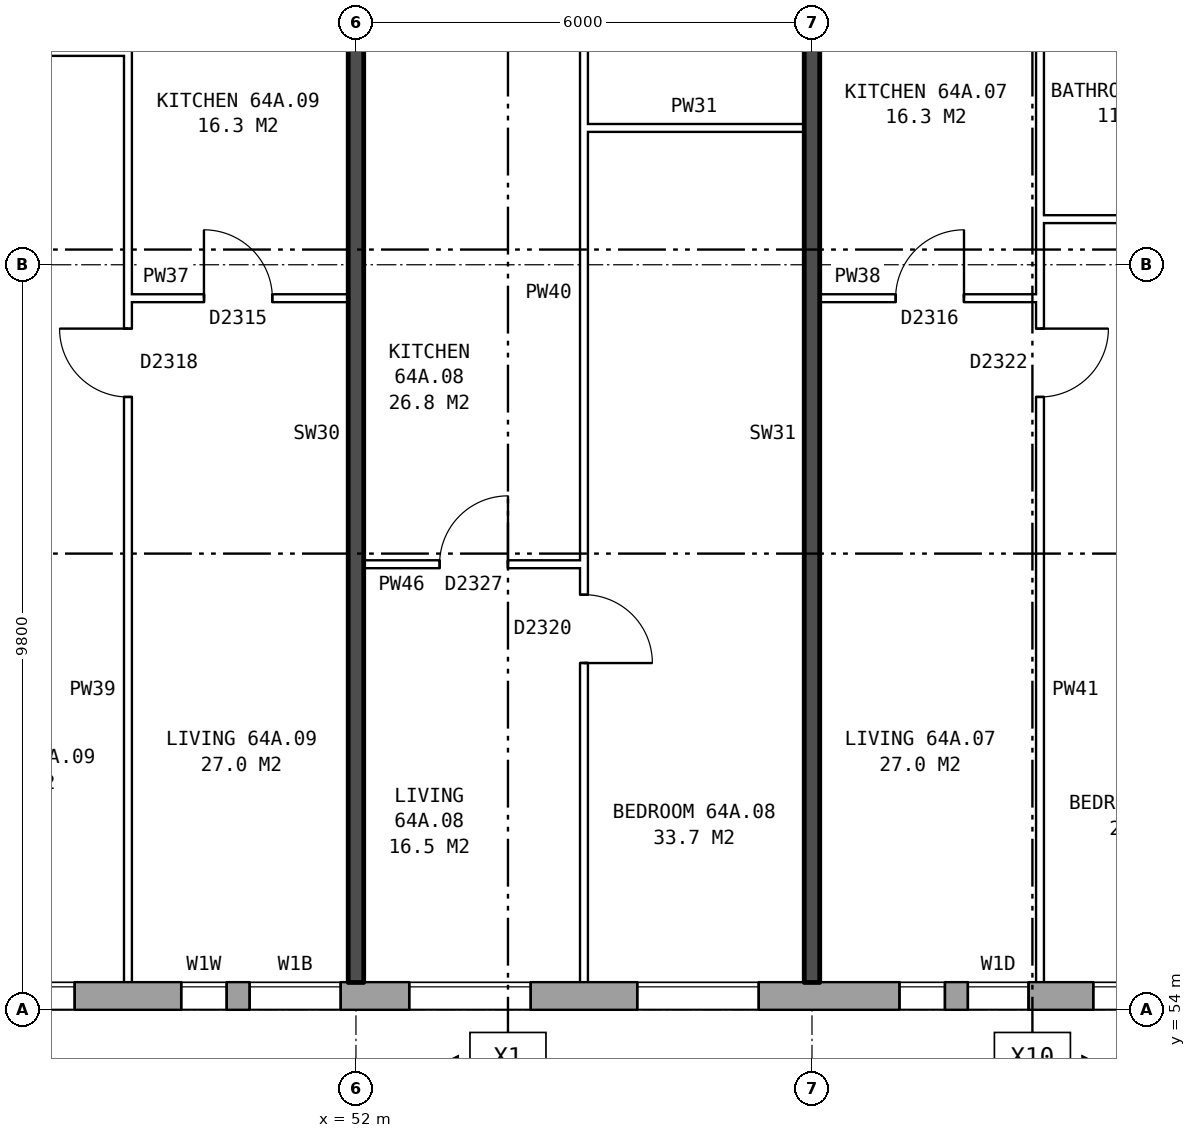
"""IFC4 building model, lengths in metres.
Left out: names, types, materials, properties, quantities, classifications, styles, units other than length and angle.
Written with IfcOpenShell. Run it as: python <this file> out.ifc"""

import sys

from ifc_helpers import new_model, si_unit, direction, frame, frame_2d, origin, place, context, subcontext, project, spatial, rectangle, extrude, element, fill, save


model = new_model("IFC4")
c1 = context("Model", 3, precision=1e-05, world=origin(), true_north=direction((0.0, 1.0)))
c2 = subcontext(c1, "Body", "Model", "MODEL_VIEW")
j1 = project(units=[si_unit("LENGTHUNIT", "METRE"), si_unit("PLANEANGLEUNIT", "RADIAN")], contexts=[c1])
p1 = place(None, origin())
s1 = spatial("IfcSite", under=j1, at=p1, CompositionType="ELEMENT")
p2 = place(p1, origin())
s2 = spatial("IfcBuilding", under=s1, at=p2, CompositionType="ELEMENT")
p3 = place(p2, frame((0.0, 0.0, 227.6)))
s3 = spatial("IfcBuildingStorey", under=s2, at=p3, CompositionType="ELEMENT", Elevation=227.6)
p4 = place(p3, frame((35.075, 54.18, 0.0), z_axis=(0.0, 0.0, 1.0), x_axis=(1.0, 0.0, 0.0)))
e1 = element("IfcWall", 1, at=p4, inside=s3, PredefinedType="STANDARD", context=c2, shape_type="SweptSolid", body=[
    extrude(rectangle(XDim=39.875, YDim=0.36, at=frame_2d((19.938, 0.0))), origin(), (0.0, 0.0, 1.0), 2.85),
])
p5 = place(p4, frame((2.625, 0.0, 0.8)))
e2 = element("IfcOpeningElement", 2, at=p5, cuts=e1, PredefinedType="OPENING", context=c2, shape_type="SweptSolid", body=[
    extrude(rectangle(XDim=1.6, YDim=1.8, at=frame_2d((0.8, 0.9))), frame((0.0, 0.19, 0.0), z_axis=(0.0, -1.0, 0.0), x_axis=(1.0, 0.0, 0.0)), (0.0, 0.0, 1.0), 0.38),
])
p6 = place(p4, frame((5.625, 0.0, 0.8)))
e3 = element("IfcOpeningElement", 3, at=p6, cuts=e1, PredefinedType="OPENING", context=c2, shape_type="SweptSolid", body=[
    extrude(rectangle(XDim=1.6, YDim=1.8, at=frame_2d((0.8, 0.9))), frame((0.0, 0.19, 0.0), z_axis=(0.0, -1.0, 0.0), x_axis=(1.0, 0.0, 0.0)), (0.0, 0.0, 1.0), 0.38),
])
p7 = place(p4, frame((8.625, 0.0, 0.8)))
e4 = element("IfcOpeningElement", 4, at=p7, cuts=e1, PredefinedType="OPENING", context=c2, shape_type="SweptSolid", body=[
    extrude(rectangle(XDim=1.6, YDim=1.8, at=frame_2d((0.8, 0.9))), frame((0.0, 0.19, 0.0), z_axis=(0.0, -1.0, 0.0), x_axis=(1.0, 0.0, 0.0)), (0.0, 0.0, 1.0), 0.38),
])
p8 = place(p4, frame((11.625, 0.0, 0.8)))
e5 = element("IfcOpeningElement", 5, at=p8, cuts=e1, PredefinedType="OPENING", context=c2, shape_type="SweptSolid", body=[
    extrude(rectangle(XDim=1.6, YDim=1.8, at=frame_2d((0.8, 0.9))), frame((0.0, 0.19, 0.0), z_axis=(0.0, -1.0, 0.0), x_axis=(1.0, 0.0, 0.0)), (0.0, 0.0, 1.0), 0.38),
])
p9 = place(p4, frame((14.625, 0.0, 0.35)))
e6 = element("IfcOpeningElement", 6, at=p9, cuts=e1, PredefinedType="OPENING", context=c2, shape_type="SweptSolid", body=[
    extrude(rectangle(XDim=0.6, YDim=0.9, at=frame_2d((0.3, 0.45))), frame((0.0, 0.19, 0.0), z_axis=(0.0, -1.0, 0.0), x_axis=(1.0, 0.0, 0.0)), (0.0, 0.0, 1.0), 0.38),
])
p10 = place(p4, frame((17.625, 0.0, 0.8)))
e7 = element("IfcOpeningElement", 7, at=p10, cuts=e1, PredefinedType="OPENING", context=c2, shape_type="SweptSolid", body=[
    extrude(rectangle(XDim=1.6, YDim=1.8, at=frame_2d((0.8, 0.9))), frame((0.0, 0.19, 0.0), z_axis=(0.0, -1.0, 0.0), x_axis=(1.0, 0.0, 0.0)), (0.0, 0.0, 1.0), 0.38),
])
p11 = place(p4, frame((20.625, 0.0, 0.8)))
e8 = element("IfcOpeningElement", 8, at=p11, cuts=e1, PredefinedType="OPENING", context=c2, shape_type="SweptSolid", body=[
    extrude(rectangle(XDim=1.6, YDim=1.8, at=frame_2d((0.8, 0.9))), frame((0.0, 0.19, 0.0), z_axis=(0.0, -1.0, 0.0), x_axis=(1.0, 0.0, 0.0)), (0.0, 0.0, 1.0), 0.38),
])
p12 = place(p4, frame((24.075, 0.0, 1.7)))
e9 = element("IfcOpeningElement", 9, at=p12, cuts=e1, PredefinedType="OPENING", context=c2, shape_type="SweptSolid", body=[
    extrude(rectangle(XDim=0.6, YDim=0.9, at=frame_2d((0.3, 0.45))), frame((0.0, 0.19, 0.0), z_axis=(0.0, -1.0, 0.0), x_axis=(1.0, 0.0, 0.0)), (0.0, 0.0, 1.0), 0.38),
])
p13 = place(p4, frame((26.625, 0.0, 0.8)))
e10 = element("IfcOpeningElement", 10, at=p13, cuts=e1, PredefinedType="OPENING", context=c2, shape_type="SweptSolid", body=[
    extrude(rectangle(XDim=1.6, YDim=1.8, at=frame_2d((0.8, 0.9))), frame((0.0, 0.19, 0.0), z_axis=(0.0, -1.0, 0.0), x_axis=(1.0, 0.0, 0.0)), (0.0, 0.0, 1.0), 0.38),
])
p14 = place(p4, frame((29.625, 0.0, 0.8)))
e11 = element("IfcOpeningElement", 11, at=p14, cuts=e1, PredefinedType="OPENING", context=c2, shape_type="SweptSolid", body=[
    extrude(rectangle(XDim=1.6, YDim=1.8, at=frame_2d((0.8, 0.9))), frame((0.0, 0.19, 0.0), z_axis=(0.0, -1.0, 0.0), x_axis=(1.0, 0.0, 0.0)), (0.0, 0.0, 1.0), 0.38),
])
p15 = place(p4, frame((32.625, 0.0, 0.8)))
e12 = element("IfcOpeningElement", 12, at=p15, cuts=e1, PredefinedType="OPENING", context=c2, shape_type="SweptSolid", body=[
    extrude(rectangle(XDim=1.6, YDim=1.8, at=frame_2d((0.8, 0.9))), frame((0.0, 0.19, 0.0), z_axis=(0.0, -1.0, 0.0), x_axis=(1.0, 0.0, 0.0)), (0.0, 0.0, 1.0), 0.38),
])
p16 = place(p4, frame((35.625, 0.0, 0.8)))
e13 = element("IfcOpeningElement", 13, at=p16, cuts=e1, PredefinedType="OPENING", context=c2, shape_type="SweptSolid", body=[
    extrude(rectangle(XDim=1.6, YDim=1.8, at=frame_2d((0.8, 0.9))), frame((0.0, 0.19, 0.0), z_axis=(0.0, -1.0, 0.0), x_axis=(1.0, 0.0, 0.0)), (0.0, 0.0, 1.0), 0.38),
])
p17 = place(p4, frame((15.525, 0.0, 0.75)))
e14 = element("IfcOpeningElement", 14, at=p17, cuts=e1, PredefinedType="OPENING", context=c2, shape_type="SweptSolid", body=[
    extrude(rectangle(XDim=1.2, YDim=1.8, at=frame_2d((0.6, 0.9))), frame((0.0, 0.19, 0.0), z_axis=(0.0, -1.0, 0.0), x_axis=(1.0, 0.0, 0.0)), (0.0, 0.0, 1.0), 0.38),
])
p18 = place(p4, frame((24.975, 0.0, 0.8)))
e15 = element("IfcOpeningElement", 15, at=p18, cuts=e1, PredefinedType="OPENING", context=c2, shape_type="SweptSolid", body=[
    extrude(rectangle(XDim=0.8, YDim=1.8, at=frame_2d((0.4, 0.9))), frame((0.0, 0.19, 0.0), z_axis=(0.0, -1.0, 0.0), x_axis=(1.0, 0.0, 0.0)), (0.0, 0.0, 1.0), 0.38),
])
p19 = place(p3, frame((52.1, 59.86, 0.0), z_axis=(0.0, 0.0, 1.0), x_axis=(1.0, 0.0, 0.0)))
e16 = element("IfcWall", 16, at=p19, inside=s3, PredefinedType="PARTITIONING", context=c2, shape_type="SweptSolid", body=[
    extrude(rectangle(XDim=2.9, YDim=0.1, at=frame_2d((1.45, 0.0))), origin(), (0.0, 0.0, 1.0), 2.85),
])
p20 = place(p19, frame((1.0, 0.0, 0.0)))
e17 = element("IfcOpeningElement", 17, at=p20, cuts=e16, PredefinedType="OPENING", context=c2, shape_type="SweptSolid", body=[
    extrude(rectangle(XDim=0.9, YDim=2.1, at=frame_2d((0.45, 1.05))), frame((0.0, 0.06, 0.0), z_axis=(0.0, -1.0, 0.0), x_axis=(1.0, 0.0, 0.0)), (0.0, 0.0, 1.0), 0.12),
])
p21 = place(p3, frame((49.0, 63.36, 0.0), z_axis=(0.0, 0.0, 1.0), x_axis=(1.0, 0.0, 0.0)))
e18 = element("IfcWall", 18, at=p21, inside=s3, PredefinedType="PARTITIONING", context=c2, shape_type="SweptSolid", body=[
    extrude(rectangle(XDim=2.9, YDim=0.1, at=frame_2d((1.45, 0.0))), origin(), (0.0, 0.0, 1.0), 2.85),
])
p22 = place(p21, frame((1.0, 0.0, 0.0)))
e19 = element("IfcOpeningElement", 19, at=p22, cuts=e18, PredefinedType="OPENING", context=c2, shape_type="SweptSolid", body=[
    extrude(rectangle(XDim=0.9, YDim=2.1, at=frame_2d((0.45, 1.05))), frame((0.0, 0.06, 0.0), z_axis=(0.0, -1.0, 0.0), x_axis=(1.0, 0.0, 0.0)), (0.0, 0.0, 1.0), 0.12),
])
p23 = place(p3, frame((58.1, 63.36, 0.0), z_axis=(0.0, 0.0, 1.0), x_axis=(1.0, 0.0, 0.0)))
e20 = element("IfcWall", 20, at=p23, inside=s3, PredefinedType="PARTITIONING", context=c2, shape_type="SweptSolid", body=[
    extrude(rectangle(XDim=2.9, YDim=0.1, at=frame_2d((1.45, 0.0))), origin(), (0.0, 0.0, 1.0), 2.85),
])
p24 = place(p23, frame((1.0, 0.0, 0.0)))
e21 = element("IfcOpeningElement", 21, at=p24, cuts=e20, PredefinedType="OPENING", context=c2, shape_type="SweptSolid", body=[
    extrude(rectangle(XDim=0.9, YDim=2.1, at=frame_2d((0.45, 1.05))), frame((0.0, 0.06, 0.0), z_axis=(0.0, -1.0, 0.0), x_axis=(1.0, 0.0, 0.0)), (0.0, 0.0, 1.0), 0.12),
])
p25 = place(p3, frame((61.0, 64.4, 0.0), z_axis=(0.0, 0.0, 1.0), x_axis=(1.0, 0.0, 0.0)))
e22 = element("IfcWall", 22, at=p25, inside=s3, PredefinedType="PARTITIONING", context=c2, shape_type="SweptSolid", body=[
    extrude(rectangle(XDim=2.64, YDim=0.1, at=frame_2d((1.32, 0.0))), origin(), (0.0, 0.0, 1.0), 2.85),
])
for number, where, z_axis, x_axis in (
    (23, (55.0, 65.6, 0.0), (0.0, 0.0, 1.0), (1.0, 0.0, 0.0)),
    (24, (46.1, 66.6, 0.0), (0.0, 0.0, 1.0), (1.0, 0.0, 0.0)),
):
    element("IfcWall", number, at=place(p3, frame(where, z_axis=z_axis, x_axis=x_axis)), inside=s3, PredefinedType="PARTITIONING", context=c2, shape_type="SweptSolid", body=[
        extrude(rectangle(XDim=2.9, YDim=0.1, at=frame_2d((1.45, 0.0))), origin(), (0.0, 0.0, 1.0), 2.85),
    ])
p26 = place(p3, frame((49.0, 54.36, 0.0), z_axis=(0.0, 0.0, 1.0), x_axis=(0.0, 1.0, 0.0)))
e25 = element("IfcWall", 25, at=p26, inside=s3, PredefinedType="PARTITIONING", context=c2, shape_type="SweptSolid", body=[
    extrude(rectangle(XDim=14.34, YDim=0.1, at=frame_2d((7.17, 0.0))), origin(), (0.0, 0.0, 1.0), 2.85),
])
p27 = place(p26, frame((7.7, 0.0, 0.0)))
e26 = element("IfcOpeningElement", 26, at=p27, cuts=e25, PredefinedType="OPENING", context=c2, shape_type="SweptSolid", body=[
    extrude(rectangle(XDim=0.9, YDim=2.1, at=frame_2d((0.45, 1.05))), frame((0.0, 0.06, 0.0), z_axis=(0.0, -1.0, 0.0), x_axis=(1.0, 0.0, 0.0)), (0.0, 0.0, 1.0), 0.12),
])
p28 = place(p26, frame((13.04, 0.0, 0.0)))
e27 = element("IfcOpeningElement", 27, at=p28, cuts=e25, PredefinedType="OPENING", context=c2, shape_type="SweptSolid", body=[
    extrude(rectangle(XDim=0.9, YDim=2.1, at=frame_2d((0.45, 1.05))), frame((0.0, 0.06, 0.0), z_axis=(0.0, -1.0, 0.0), x_axis=(1.0, 0.0, 0.0)), (0.0, 0.0, 1.0), 0.12),
])
p29 = place(p3, frame((52.0, 54.36, 0.0), z_axis=(0.0, 0.0, 1.0), x_axis=(0.0, 1.0, 0.0)))
e28 = element("IfcWall", 28, at=p29, inside=s3, PredefinedType="SOLIDWALL", context=c2, shape_type="SweptSolid", body=[
    extrude(rectangle(XDim=14.44, YDim=0.2, at=frame_2d((7.22, 0.0))), origin(), (0.0, 0.0, 1.0), 2.85),
])
p30 = place(p3, frame((55.0, 54.36, 0.0), z_axis=(0.0, 0.0, 1.0), x_axis=(0.0, 1.0, 0.0)))
e29 = element("IfcWall", 29, at=p30, inside=s3, PredefinedType="PARTITIONING", context=c2, shape_type="SweptSolid", body=[
    extrude(rectangle(XDim=14.34, YDim=0.1, at=frame_2d((7.17, 0.0))), origin(), (0.0, 0.0, 1.0), 2.85),
])
p31 = place(p30, frame((4.2, 0.0, 0.0)))
e30 = element("IfcOpeningElement", 30, at=p31, cuts=e29, PredefinedType="OPENING", context=c2, shape_type="SweptSolid", body=[
    extrude(rectangle(XDim=0.9, YDim=2.1, at=frame_2d((0.45, 1.05))), frame((0.0, 0.06, 0.0), z_axis=(0.0, -1.0, 0.0), x_axis=(1.0, 0.0, 0.0)), (0.0, 0.0, 1.0), 0.12),
])
p32 = place(p30, frame((13.04, 0.0, 0.0)))
e31 = element("IfcOpeningElement", 31, at=p32, cuts=e29, PredefinedType="OPENING", context=c2, shape_type="SweptSolid", body=[
    extrude(rectangle(XDim=0.9, YDim=2.1, at=frame_2d((0.45, 1.05))), frame((0.0, 0.06, 0.0), z_axis=(0.0, -1.0, 0.0), x_axis=(1.0, 0.0, 0.0)), (0.0, 0.0, 1.0), 0.12),
])
p33 = place(p3, frame((58.0, 54.36, 0.0), z_axis=(0.0, 0.0, 1.0), x_axis=(0.0, 1.0, 0.0)))
e32 = element("IfcWall", 32, at=p33, inside=s3, PredefinedType="SOLIDWALL", context=c2, shape_type="SweptSolid", body=[
    extrude(rectangle(XDim=14.44, YDim=0.2, at=frame_2d((7.22, 0.0))), origin(), (0.0, 0.0, 1.0), 2.85),
])
p34 = place(p3, frame((61.0, 54.36, 0.0), z_axis=(0.0, 0.0, 1.0), x_axis=(0.0, 1.0, 0.0)))
e33 = element("IfcWall", 33, at=p34, inside=s3, PredefinedType="PARTITIONING", context=c2, shape_type="SweptSolid", body=[
    extrude(rectangle(XDim=14.34, YDim=0.1, at=frame_2d((7.17, 0.0))), origin(), (0.0, 0.0, 1.0), 2.85),
])
p35 = place(p34, frame((7.7, 0.0, 0.0)))
e34 = element("IfcOpeningElement", 34, at=p35, cuts=e33, PredefinedType="OPENING", context=c2, shape_type="SweptSolid", body=[
    extrude(rectangle(XDim=0.9, YDim=2.1, at=frame_2d((0.45, 1.05))), frame((0.0, 0.06, 0.0), z_axis=(0.0, -1.0, 0.0), x_axis=(1.0, 0.0, 0.0)), (0.0, 0.0, 1.0), 0.12),
])
p36 = place(p34, frame((13.04, 0.0, 0.0)))
e35 = element("IfcOpeningElement", 35, at=p36, cuts=e33, PredefinedType="OPENING", context=c2, shape_type="SweptSolid", body=[
    extrude(rectangle(XDim=0.9, YDim=2.1, at=frame_2d((0.45, 1.05))), frame((0.0, 0.06, 0.0), z_axis=(0.0, -1.0, 0.0), x_axis=(1.0, 0.0, 0.0)), (0.0, 0.0, 1.0), 0.12),
])
p37 = place(p8, origin())
e36 = element("IfcWindow", 36, at=p37, inside=s3, PartitioningType="SINGLE_PANEL", PredefinedType="WINDOW", context=c2, shape_type="SweptSolid", body=[
    extrude(rectangle(XDim=1.6, YDim=1.8, at=frame_2d((0.8, 0.9))), frame((0.0, 0.15, 0.0), z_axis=(0.0, -1.0, 0.0), x_axis=(1.0, 0.0, 0.0)), (0.0, 0.0, 1.0), 0.06),
])
fill(e5, e36)
p38 = place(p9, origin())
e37 = element("IfcWindow", 37, at=p38, inside=s3, PartitioningType="SINGLE_PANEL", PredefinedType="WINDOW", context=c2, shape_type="SweptSolid", body=[
    extrude(rectangle(XDim=0.6, YDim=0.9, at=frame_2d((0.3, 0.45))), frame((0.0, 0.15, 0.0), z_axis=(0.0, -1.0, 0.0), x_axis=(1.0, 0.0, 0.0)), (0.0, 0.0, 1.0), 0.06),
])
fill(e6, e37)
p39 = place(p10, origin())
e38 = element("IfcWindow", 38, at=p39, inside=s3, PartitioningType="SINGLE_PANEL", PredefinedType="WINDOW", context=c2, shape_type="SweptSolid", body=[
    extrude(rectangle(XDim=1.6, YDim=1.8, at=frame_2d((0.8, 0.9))), frame((0.0, 0.15, 0.0), z_axis=(0.0, -1.0, 0.0), x_axis=(1.0, 0.0, 0.0)), (0.0, 0.0, 1.0), 0.06),
])
fill(e7, e38)
p40 = place(p11, origin())
e39 = element("IfcWindow", 39, at=p40, inside=s3, PartitioningType="SINGLE_PANEL", PredefinedType="WINDOW", context=c2, shape_type="SweptSolid", body=[
    extrude(rectangle(XDim=1.6, YDim=1.8, at=frame_2d((0.8, 0.9))), frame((0.0, 0.15, 0.0), z_axis=(0.0, -1.0, 0.0), x_axis=(1.0, 0.0, 0.0)), (0.0, 0.0, 1.0), 0.06),
])
fill(e8, e39)
p41 = place(p12, origin())
e40 = element("IfcWindow", 40, at=p41, inside=s3, PartitioningType="SINGLE_PANEL", PredefinedType="WINDOW", context=c2, shape_type="SweptSolid", body=[
    extrude(rectangle(XDim=0.6, YDim=0.9, at=frame_2d((0.3, 0.45))), frame((0.0, 0.15, 0.0), z_axis=(0.0, -1.0, 0.0), x_axis=(1.0, 0.0, 0.0)), (0.0, 0.0, 1.0), 0.06),
])
fill(e9, e40)
p42 = place(p13, origin())
e41 = element("IfcWindow", 41, at=p42, inside=s3, PartitioningType="SINGLE_PANEL", PredefinedType="WINDOW", context=c2, shape_type="SweptSolid", body=[
    extrude(rectangle(XDim=1.6, YDim=1.8, at=frame_2d((0.8, 0.9))), frame((0.0, 0.15, 0.0), z_axis=(0.0, -1.0, 0.0), x_axis=(1.0, 0.0, 0.0)), (0.0, 0.0, 1.0), 0.06),
])
fill(e10, e41)
p43 = place(p35, frame((0.9, 0.0, 0.0), z_axis=(0.0, 0.0, 1.0), x_axis=(-1.0, 0.0, 0.0)))
e42 = element("IfcDoor", 42, at=p43, inside=s3, OperationType="SINGLE_SWING_LEFT", PredefinedType="DOOR", context=c2, shape_type="SweptSolid", body=[
    extrude(rectangle(XDim=0.9, YDim=2.1, at=frame_2d((0.45, 1.05))), frame((0.0, 0.025, 0.0), z_axis=(0.0, -1.0, 0.0), x_axis=(1.0, 0.0, 0.0)), (0.0, 0.0, 1.0), 0.05),
])
fill(e34, e42)
p44 = place(p24, origin())
e43 = element("IfcDoor", 43, at=p44, inside=s3, OperationType="SINGLE_SWING_RIGHT", PredefinedType="DOOR", context=c2, shape_type="SweptSolid", body=[
    extrude(rectangle(XDim=0.9, YDim=2.1, at=frame_2d((0.45, 1.05))), frame((0.0, 0.025, 0.0), z_axis=(0.0, -1.0, 0.0), x_axis=(1.0, 0.0, 0.0)), (0.0, 0.0, 1.0), 0.05),
])
fill(e21, e43)
p45 = place(p31, frame((0.9, 0.0, 0.0), z_axis=(0.0, 0.0, 1.0), x_axis=(-1.0, 0.0, 0.0)))
e44 = element("IfcDoor", 44, at=p45, inside=s3, OperationType="SINGLE_SWING_RIGHT", PredefinedType="DOOR", context=c2, shape_type="SweptSolid", body=[
    extrude(rectangle(XDim=0.9, YDim=2.1, at=frame_2d((0.45, 1.05))), frame((0.0, 0.025, 0.0), z_axis=(0.0, -1.0, 0.0), x_axis=(1.0, 0.0, 0.0)), (0.0, 0.0, 1.0), 0.05),
])
fill(e30, e44)
p46 = place(p20, origin())
e45 = element("IfcDoor", 45, at=p46, inside=s3, OperationType="SINGLE_SWING_RIGHT", PredefinedType="DOOR", context=c2, shape_type="SweptSolid", body=[
    extrude(rectangle(XDim=0.9, YDim=2.1, at=frame_2d((0.45, 1.05))), frame((0.0, 0.025, 0.0), z_axis=(0.0, -1.0, 0.0), x_axis=(1.0, 0.0, 0.0)), (0.0, 0.0, 1.0), 0.05),
])
fill(e17, e45)
p47 = place(p27, origin())
e46 = element("IfcDoor", 46, at=p47, inside=s3, OperationType="SINGLE_SWING_RIGHT", PredefinedType="DOOR", context=c2, shape_type="SweptSolid", body=[
    extrude(rectangle(XDim=0.9, YDim=2.1, at=frame_2d((0.45, 1.05))), frame((0.0, 0.025, 0.0), z_axis=(0.0, -1.0, 0.0), x_axis=(1.0, 0.0, 0.0)), (0.0, 0.0, 1.0), 0.05),
])
fill(e26, e46)
p48 = place(p22, origin())
e47 = element("IfcDoor", 47, at=p48, inside=s3, OperationType="SINGLE_SWING_LEFT", PredefinedType="DOOR", context=c2, shape_type="SweptSolid", body=[
    extrude(rectangle(XDim=0.9, YDim=2.1, at=frame_2d((0.45, 1.05))), frame((0.0, 0.025, 0.0), z_axis=(0.0, -1.0, 0.0), x_axis=(1.0, 0.0, 0.0)), (0.0, 0.0, 1.0), 0.05),
])
fill(e19, e47)
p49 = place(p17, origin())
e48 = element("IfcWindow", 48, at=p49, inside=s3, PartitioningType="SINGLE_PANEL", PredefinedType="WINDOW", context=c2, shape_type="SweptSolid", body=[
    extrude(rectangle(XDim=1.2, YDim=1.8, at=frame_2d((0.6, 0.9))), frame((0.0, 0.15, 0.0), z_axis=(0.0, -1.0, 0.0), x_axis=(1.0, 0.0, 0.0)), (0.0, 0.0, 1.0), 0.06),
])
fill(e14, e48)
p50 = place(p18, origin())
e49 = element("IfcWindow", 49, at=p50, inside=s3, PartitioningType="SINGLE_PANEL", PredefinedType="WINDOW", context=c2, shape_type="SweptSolid", body=[
    extrude(rectangle(XDim=0.8, YDim=1.8, at=frame_2d((0.4, 0.9))), frame((0.0, 0.15, 0.0), z_axis=(0.0, -1.0, 0.0), x_axis=(1.0, 0.0, 0.0)), (0.0, 0.0, 1.0), 0.06),
])
fill(e15, e49)
save(model, sys.argv[1])
